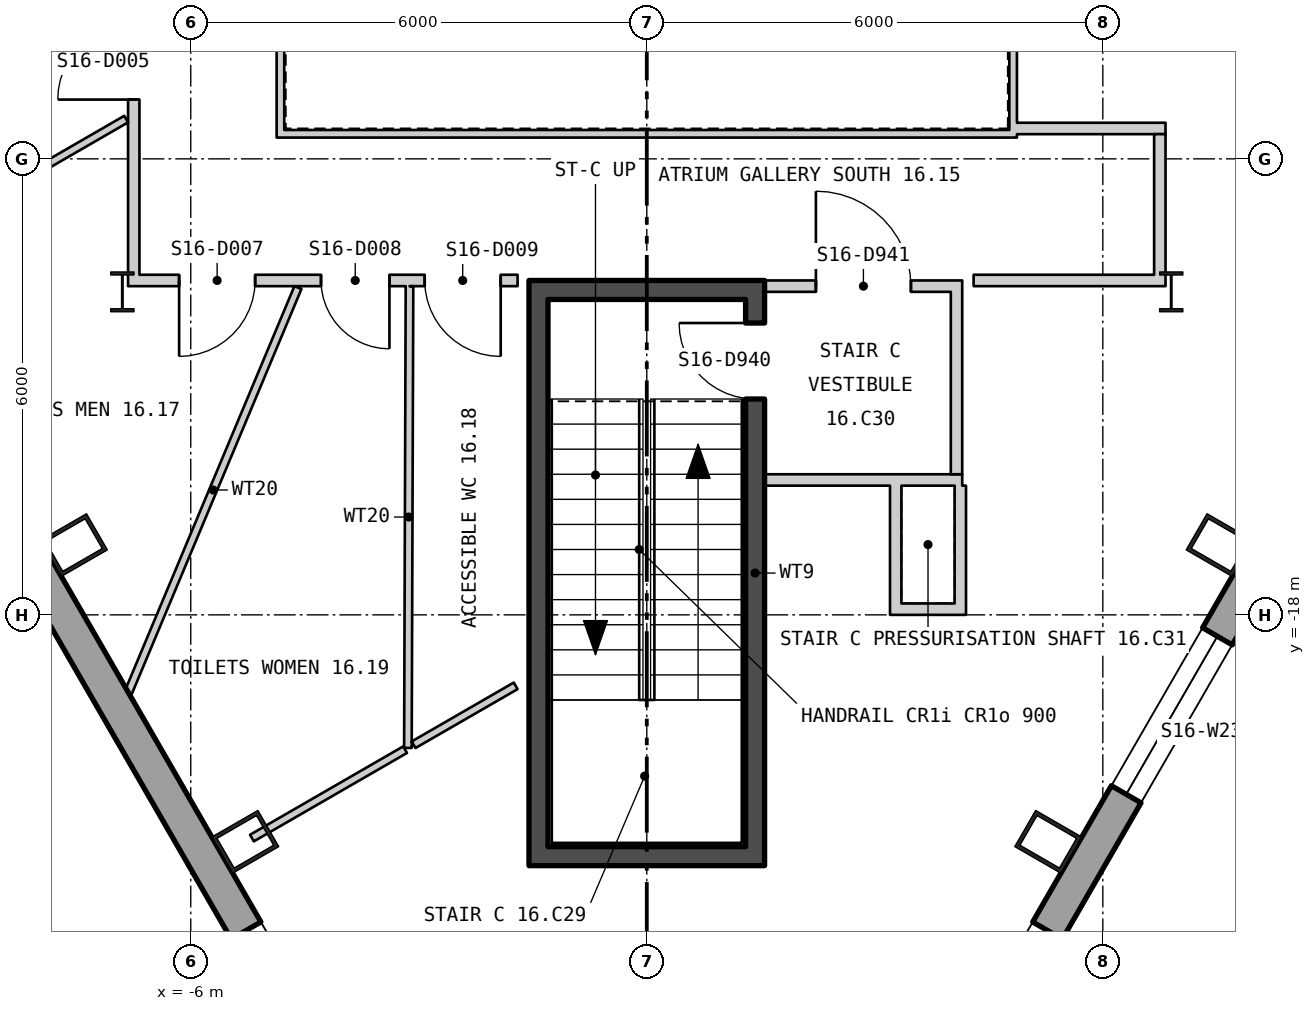
"""IFC4 building model, lengths in metres.
Left out: names, types, materials, properties, quantities, classifications, styles, units other than length and angle.
Written with IfcOpenShell. Run it as: python <this file> out.ifc"""

import sys

from ifc_helpers import new_model, si_unit, direction, frame, frame_2d, origin, origin_2d, place, context, subcontext, project, spatial, polyline, rectangle, hollow_rectangle, i_section, outline, extrude, element, fill, save


model = new_model("IFC4")
c1 = context("Model", 3, precision=1e-05, world=origin(), true_north=direction((0.0, 1.0)))
c2 = subcontext(c1, "Body", "Model", "MODEL_VIEW")
j1 = project(units=[si_unit("LENGTHUNIT", "METRE"), si_unit("PLANEANGLEUNIT", "RADIAN")], contexts=[c1])
p1 = place(None, origin())
s1 = spatial("IfcSite", under=j1, at=p1, CompositionType="ELEMENT")
p2 = place(p1, origin())
s2 = spatial("IfcBuilding", under=s1, at=p2, CompositionType="ELEMENT")
p3 = place(p2, frame((0.0, 0.0, 216.0)))
s3 = spatial("IfcBuildingStorey", under=s2, at=p3, CompositionType="ELEMENT", Elevation=216.0)
for number, where, z_axis, x_axis in (
    (1, (-7.537, -17.082, 0.0), (0.0, 0.0, 1.0), (0.5, -0.866, 0.0)),
    (2, (-5.282, -20.986, 0.0), (0.0, 0.0, 1.0), (0.5, -0.866, 0.0)),
    (3, (5.282, -20.986, 0.0), (0.0, 0.0, 1.0), (0.5, 0.866, 0.0)),
    (4, (7.537, -17.082, 0.0), (0.0, 0.0, 1.0), (0.5, 0.866, 0.0)),
):
    element("IfcColumn", number, at=place(p3, frame(where, z_axis=z_axis, x_axis=x_axis)), inside=s3, PredefinedType="COLUMN", context=c2, shape_type="SweptSolid", body=[
        extrude(hollow_rectangle(XDim=0.55, YDim=0.7, WallThickness=0.05, at=origin_2d()), origin(), (0.0, 0.0, 1.0), 3.9),
    ])
for number, where, z_axis, x_axis in (
    (5, (6.9, -13.75, 0.0), (0.0, 0.0, 1.0), (1.0, 0.0, 0.0)),
    (6, (-6.9, -13.75, 0.0), (0.0, 0.0, 1.0), (1.0, 0.0, 0.0)),
):
    element("IfcColumn", number, at=place(p3, frame(where, z_axis=z_axis, x_axis=x_axis)), inside=s3, PredefinedType="COLUMN", context=c2, shape_type="SweptSolid", body=[
        extrude(i_section(OverallWidth=0.306, OverallDepth=0.524, WebThickness=0.021, FlangeThickness=0.04, at=origin_2d()), origin(), (0.0, 0.0, 1.0), 3.9),
    ])
p4 = place(p3, frame((-26.235, 14.155, -0.18), z_axis=(0.0, 0.0, 1.0), x_axis=(0.500000335318, -0.866025210188, 0.0)))
e7 = element("IfcWall", 7, at=p4, inside=s3, PredefinedType="SOLIDWALL", context=c2, shape_type="SweptSolid", body=[
    extrude(outline(polyline([(-0.13, -0.225), (45.88, -0.225), (45.62, 0.225), (0.13, 0.225), (-0.13, -0.225)])), origin(), (0.0, 0.0, 1.0), 3.68),
])
p5 = place(p4, frame((1.425, 0.0, 1.08)))
e8 = element("IfcOpeningElement", 8, at=p5, cuts=e7, PredefinedType="OPENING", context=c2, shape_type="SweptSolid", body=[
    extrude(rectangle(XDim=2.4, YDim=2.0, at=frame_2d((1.2, 1.0))), frame((0.0, 0.235, 0.0), z_axis=(0.0, -1.0, 0.0), x_axis=(1.0, 0.0, 0.0)), (0.0, 0.0, 1.0), 0.47),
])
p6 = place(p4, frame((5.895, 0.0, 1.08)))
e9 = element("IfcOpeningElement", 9, at=p6, cuts=e7, PredefinedType="OPENING", context=c2, shape_type="SweptSolid", body=[
    extrude(rectangle(XDim=2.4, YDim=2.0, at=frame_2d((1.2, 1.0))), frame((0.0, 0.235, 0.0), z_axis=(0.0, -1.0, 0.0), x_axis=(1.0, 0.0, 0.0)), (0.0, 0.0, 1.0), 0.47),
])
p7 = place(p4, frame((10.403, 0.0, 1.08)))
e10 = element("IfcOpeningElement", 10, at=p7, cuts=e7, PredefinedType="OPENING", context=c2, shape_type="SweptSolid", body=[
    extrude(rectangle(XDim=2.4, YDim=2.0, at=frame_2d((1.2, 1.0))), frame((0.0, 0.235, 0.0), z_axis=(0.0, -1.0, 0.0), x_axis=(1.0, 0.0, 0.0)), (0.0, 0.0, 1.0), 0.47),
])
p8 = place(p4, frame((19.421, 0.0, 1.08)))
e11 = element("IfcOpeningElement", 11, at=p8, cuts=e7, PredefinedType="OPENING", context=c2, shape_type="SweptSolid", body=[
    extrude(rectangle(XDim=2.4, YDim=2.0, at=frame_2d((1.2, 1.0))), frame((0.0, 0.235, 0.0), z_axis=(0.0, -1.0, 0.0), x_axis=(1.0, 0.0, 0.0)), (0.0, 0.0, 1.0), 0.47),
])
p9 = place(p4, frame((23.929, 0.0, 1.08)))
e12 = element("IfcOpeningElement", 12, at=p9, cuts=e7, PredefinedType="OPENING", context=c2, shape_type="SweptSolid", body=[
    extrude(rectangle(XDim=2.4, YDim=2.0, at=frame_2d((1.2, 1.0))), frame((0.0, 0.235, 0.0), z_axis=(0.0, -1.0, 0.0), x_axis=(1.0, 0.0, 0.0)), (0.0, 0.0, 1.0), 0.47),
])
p10 = place(p4, frame((28.438, 0.0, 1.08)))
e13 = element("IfcOpeningElement", 13, at=p10, cuts=e7, PredefinedType="OPENING", context=c2, shape_type="SweptSolid", body=[
    extrude(rectangle(XDim=2.4, YDim=2.0, at=frame_2d((1.2, 1.0))), frame((0.0, 0.235, 0.0), z_axis=(0.0, -1.0, 0.0), x_axis=(1.0, 0.0, 0.0)), (0.0, 0.0, 1.0), 0.47),
])
p11 = place(p4, frame((32.947, 0.0, 1.08)))
e14 = element("IfcOpeningElement", 14, at=p11, cuts=e7, PredefinedType="OPENING", context=c2, shape_type="SweptSolid", body=[
    extrude(rectangle(XDim=2.4, YDim=2.0, at=frame_2d((1.2, 1.0))), frame((0.0, 0.235, 0.0), z_axis=(0.0, -1.0, 0.0), x_axis=(1.0, 0.0, 0.0)), (0.0, 0.0, 1.0), 0.47),
])
p12 = place(p4, frame((41.925, 0.0, 1.08)))
e15 = element("IfcOpeningElement", 15, at=p12, cuts=e7, PredefinedType="OPENING", context=c2, shape_type="SweptSolid", body=[
    extrude(rectangle(XDim=2.4, YDim=2.0, at=frame_2d((1.2, 1.0))), frame((0.0, 0.235, 0.0), z_axis=(0.0, -1.0, 0.0), x_axis=(1.0, 0.0, 0.0)), (0.0, 0.0, 1.0), 0.47),
])
p13 = place(p3, frame((3.36, -25.466, -0.18), z_axis=(0.0, 0.0, 1.0), x_axis=(0.500000335318, 0.866025210188, 0.0)))
e16 = element("IfcWall", 16, at=p13, inside=s3, PredefinedType="SOLIDWALL", context=c2, shape_type="SweptSolid", body=[
    extrude(outline(polyline([(-0.13, -0.225), (45.88, -0.225), (45.62, 0.225), (0.13, 0.225), (-0.13, -0.225)])), origin(), (0.0, 0.0, 1.0), 3.68),
])
p14 = place(p13, frame((1.425, 0.0, 1.08)))
e17 = element("IfcOpeningElement", 17, at=p14, cuts=e16, PredefinedType="OPENING", context=c2, shape_type="SweptSolid", body=[
    extrude(rectangle(XDim=2.4, YDim=2.0, at=frame_2d((1.2, 1.0))), frame((0.0, 0.235, 0.0), z_axis=(0.0, -1.0, 0.0), x_axis=(1.0, 0.0, 0.0)), (0.0, 0.0, 1.0), 0.47),
])
p15 = place(p13, frame((5.895, 0.0, 1.08)))
e18 = element("IfcOpeningElement", 18, at=p15, cuts=e16, PredefinedType="OPENING", context=c2, shape_type="SweptSolid", body=[
    extrude(rectangle(XDim=2.4, YDim=2.0, at=frame_2d((1.2, 1.0))), frame((0.0, 0.235, 0.0), z_axis=(0.0, -1.0, 0.0), x_axis=(1.0, 0.0, 0.0)), (0.0, 0.0, 1.0), 0.47),
])
p16 = place(p13, frame((10.403, 0.0, 1.08)))
e19 = element("IfcOpeningElement", 19, at=p16, cuts=e16, PredefinedType="OPENING", context=c2, shape_type="SweptSolid", body=[
    extrude(rectangle(XDim=2.4, YDim=2.0, at=frame_2d((1.2, 1.0))), frame((0.0, 0.235, 0.0), z_axis=(0.0, -1.0, 0.0), x_axis=(1.0, 0.0, 0.0)), (0.0, 0.0, 1.0), 0.47),
])
p17 = place(p13, frame((14.912, 0.0, 1.08)))
e20 = element("IfcOpeningElement", 20, at=p17, cuts=e16, PredefinedType="OPENING", context=c2, shape_type="SweptSolid", body=[
    extrude(rectangle(XDim=2.4, YDim=2.0, at=frame_2d((1.2, 1.0))), frame((0.0, 0.235, 0.0), z_axis=(0.0, -1.0, 0.0), x_axis=(1.0, 0.0, 0.0)), (0.0, 0.0, 1.0), 0.47),
])
p18 = place(p13, frame((19.421, 0.0, 1.08)))
e21 = element("IfcOpeningElement", 21, at=p18, cuts=e16, PredefinedType="OPENING", context=c2, shape_type="SweptSolid", body=[
    extrude(rectangle(XDim=2.4, YDim=2.0, at=frame_2d((1.2, 1.0))), frame((0.0, 0.235, 0.0), z_axis=(0.0, -1.0, 0.0), x_axis=(1.0, 0.0, 0.0)), (0.0, 0.0, 1.0), 0.47),
])
p19 = place(p13, frame((23.929, 0.0, 1.08)))
e22 = element("IfcOpeningElement", 22, at=p19, cuts=e16, PredefinedType="OPENING", context=c2, shape_type="SweptSolid", body=[
    extrude(rectangle(XDim=2.4, YDim=2.0, at=frame_2d((1.2, 1.0))), frame((0.0, 0.235, 0.0), z_axis=(0.0, -1.0, 0.0), x_axis=(1.0, 0.0, 0.0)), (0.0, 0.0, 1.0), 0.47),
])
p20 = place(p13, frame((32.947, 0.0, 1.08)))
e23 = element("IfcOpeningElement", 23, at=p20, cuts=e16, PredefinedType="OPENING", context=c2, shape_type="SweptSolid", body=[
    extrude(rectangle(XDim=2.4, YDim=2.0, at=frame_2d((1.2, 1.0))), frame((0.0, 0.235, 0.0), z_axis=(0.0, -1.0, 0.0), x_axis=(1.0, 0.0, 0.0)), (0.0, 0.0, 1.0), 0.47),
])
p21 = place(p13, frame((37.455, 0.0, 1.08)))
e24 = element("IfcOpeningElement", 24, at=p21, cuts=e16, PredefinedType="OPENING", context=c2, shape_type="SweptSolid", body=[
    extrude(rectangle(XDim=2.4, YDim=2.0, at=frame_2d((1.2, 1.0))), frame((0.0, 0.235, 0.0), z_axis=(0.0, -1.0, 0.0), x_axis=(1.0, 0.0, 0.0)), (0.0, 0.0, 1.0), 0.47),
])
p22 = place(p13, frame((41.925, 0.0, 1.08)))
e25 = element("IfcOpeningElement", 25, at=p22, cuts=e16, PredefinedType="OPENING", context=c2, shape_type="SweptSolid", body=[
    extrude(rectangle(XDim=2.4, YDim=2.0, at=frame_2d((1.2, 1.0))), frame((0.0, 0.235, 0.0), z_axis=(0.0, -1.0, 0.0), x_axis=(1.0, 0.0, 0.0)), (0.0, 0.0, 1.0), 0.47),
])
p23 = place(p3, frame((-4.87, -11.67, 0.0), z_axis=(0.0, 0.0, 1.0), x_axis=(1.0, 0.0, 0.0)))
e26 = element("IfcWall", 26, at=p23, inside=s3, PredefinedType="PARTITIONING", context=c2, shape_type="SweptSolid", body=[
    extrude(rectangle(XDim=9.74, YDim=0.1, at=frame_2d((4.87, 0.0))), origin(), (0.0, 0.0, 1.0), 3.7),
])
for number, where, z_axis, x_axis in (
    (27, (4.82, -11.62, 0.0), (0.0, 0.0, 1.0), (0.0, 1.0, 0.0)),
    (28, (-4.82, -3.58, 0.0), (0.0, 0.0, 1.0), (0.0, -1.0, 0.0)),
):
    element("IfcWall", number, at=place(p3, frame(where, z_axis=z_axis, x_axis=x_axis)), inside=s3, PredefinedType="PARTITIONING", context=c2, shape_type="SweptSolid", body=[
        extrude(rectangle(XDim=8.04, YDim=0.1, at=frame_2d((4.02, 0.0))), origin(), (0.0, 0.0, 1.0), 3.7),
    ])
p24 = place(p3, frame((-1.425, -21.05, 0.0), z_axis=(0.0, 0.0, 1.0), x_axis=(0.0, 1.0, 0.0)))
e29 = element("IfcWall", 29, at=p24, inside=s3, PredefinedType="SHEAR", context=c2, shape_type="SweptSolid", body=[
    extrude(rectangle(XDim=7.2, YDim=0.25, at=frame_2d((3.6, 0.0))), origin(), (0.0, 0.0, 1.0), 3.7),
])
p25 = place(p3, frame((1.425, -21.05, 0.0), z_axis=(0.0, 0.0, 1.0), x_axis=(0.0, 1.0, 0.0)))
e30 = element("IfcWall", 30, at=p25, inside=s3, PredefinedType="SHEAR", context=c2, shape_type="SweptSolid", body=[
    extrude(rectangle(XDim=7.2, YDim=0.25, at=frame_2d((3.6, 0.0))), origin(), (0.0, 0.0, 1.0), 3.7),
])
p26 = place(p25, frame((5.89, 0.0, 0.0)))
e31 = element("IfcOpeningElement", 31, at=p26, cuts=e30, PredefinedType="OPENING", context=c2, shape_type="SweptSolid", body=[
    extrude(rectangle(XDim=1.0, YDim=2.1, at=frame_2d((0.5, 1.05))), frame((0.0, 0.135, 0.0), z_axis=(0.0, -1.0, 0.0), x_axis=(1.0, 0.0, 0.0)), (0.0, 0.0, 1.0), 0.27),
])
for number, where, z_axis, x_axis in (
    (32, (-1.55, -21.175, 0.0), (0.0, 0.0, 1.0), (1.0, 0.0, 0.0)),
    (33, (-1.55, -13.725, 0.0), (0.0, 0.0, 1.0), (1.0, 0.0, 0.0)),
):
    element("IfcWall", number, at=place(p3, frame(where, z_axis=z_axis, x_axis=x_axis)), inside=s3, PredefinedType="SHEAR", context=c2, shape_type="SweptSolid", body=[
        extrude(rectangle(XDim=3.1, YDim=0.25, at=frame_2d((1.55, 0.0))), origin(), (0.0, 0.0, 1.0), 3.7),
    ])
p27 = place(p3, frame((1.55, -16.225, 0.0), z_axis=(0.0, 0.0, 1.0), x_axis=(1.0, 0.0, 0.0)))
e34 = element("IfcWall", 34, at=p27, inside=s3, PredefinedType="PARTITIONING", context=c2, shape_type="SweptSolid", body=[
    extrude(rectangle(XDim=2.6, YDim=0.15, at=frame_2d((1.3, 0.0))), origin(), (0.0, 0.0, 1.0), 3.7),
])
p28 = place(p3, frame((4.075, -16.15, 0.0), z_axis=(0.0, 0.0, 1.0), x_axis=(0.0, 1.0, 0.0)))
e35 = element("IfcWall", 35, at=p28, inside=s3, PredefinedType="PARTITIONING", context=c2, shape_type="SweptSolid", body=[
    extrude(rectangle(XDim=2.4, YDim=0.15, at=frame_2d((1.2, 0.0))), origin(), (0.0, 0.0, 1.0), 3.7),
])
p29 = place(p3, frame((1.55, -13.675, 0.0), z_axis=(0.0, 0.0, 1.0), x_axis=(1.0, 0.0, 0.0)))
e36 = element("IfcWall", 36, at=p29, inside=s3, PredefinedType="PARTITIONING", context=c2, shape_type="SweptSolid", body=[
    extrude(rectangle(XDim=2.6, YDim=0.15, at=frame_2d((1.3, 0.0))), origin(), (0.0, 0.0, 1.0), 2.91),
])
p30 = place(p29, frame((0.675, 0.0, 0.0)))
e37 = element("IfcOpeningElement", 37, at=p30, cuts=e36, PredefinedType="OPENING", context=c2, shape_type="SweptSolid", body=[
    extrude(rectangle(XDim=1.25, YDim=2.1, at=frame_2d((0.625, 1.05))), frame((0.0, 0.085, 0.0), z_axis=(0.0, -1.0, 0.0), x_axis=(1.0, 0.0, 0.0)), (0.0, 0.0, 1.0), 0.17),
])
p31 = place(p3, frame((3.275, -18.0, 0.0), z_axis=(0.0, 0.0, 1.0), x_axis=(0.0, 1.0, 0.0)))
e38 = element("IfcWall", 38, at=p31, inside=s3, PredefinedType="PARTITIONING", context=c2, shape_type="SweptSolid", body=[
    extrude(rectangle(XDim=1.7, YDim=0.15, at=frame_2d((0.85, 0.0))), origin(), (0.0, 0.0, 1.0), 3.01),
])
p32 = place(p3, frame((3.35, -17.925, 0.0), z_axis=(0.0, 0.0, 1.0), x_axis=(1.0, 0.0, 0.0)))
e39 = element("IfcWall", 39, at=p32, inside=s3, PredefinedType="PARTITIONING", context=c2, shape_type="SweptSolid", body=[
    extrude(rectangle(XDim=0.7, YDim=0.15, at=frame_2d((0.35, 0.0))), origin(), (0.0, 0.0, 1.0), 3.7),
])
p33 = place(p3, frame((4.125, -18.0, 0.0), z_axis=(0.0, 0.0, 1.0), x_axis=(0.0, 1.0, 0.0)))
e40 = element("IfcWall", 40, at=p33, inside=s3, PredefinedType="PARTITIONING", context=c2, shape_type="SweptSolid", body=[
    extrude(rectangle(XDim=1.7, YDim=0.15, at=frame_2d((0.85, 0.0))), origin(), (0.0, 0.0, 1.0), 3.7),
])
p34 = place(p3, frame((-9.705, -13.126, 0.0), z_axis=(0.0, 0.0, 1.0), x_axis=(0.865938055058, 0.500151261923, 0.0)))
e41 = element("IfcWall", 41, at=p34, inside=s3, PredefinedType="PARTITIONING", context=c2, shape_type="SweptSolid", body=[
    extrude(rectangle(XDim=3.297, YDim=0.1, at=frame_2d((1.649, 0.0))), origin(), (0.0, 0.0, 1.0), 3.7),
])
p35 = place(p3, frame((-6.821, -19.02, 0.0), z_axis=(0.0, 0.0, 1.0), x_axis=(0.386360825785, 0.922347717674, 0.0)))
e42 = element("IfcWall", 42, at=p35, inside=s3, PredefinedType="PARTITIONING", context=c2, shape_type="SweptSolid", body=[
    extrude(rectangle(XDim=5.774, YDim=0.1, at=frame_2d((2.887, 0.0))), origin(), (0.0, 0.0, 1.0), 3.7),
])
p36 = place(p3, frame((-6.75, -13.675, 0.0), z_axis=(0.0, 0.0, 1.0), x_axis=(0.0, 1.0, 0.0)))
e43 = element("IfcWall", 43, at=p36, inside=s3, PredefinedType="PARTITIONING", context=c2, shape_type="SweptSolid", body=[
    extrude(rectangle(XDim=10.263, YDim=0.15, at=frame_2d((5.131, 0.0))), origin(), (0.0, 0.0, 1.0), 3.11),
])
p37 = place(p36, frame((2.455, 0.0, 0.0)))
e44 = element("IfcOpeningElement", 44, at=p37, cuts=e43, PredefinedType="OPENING", context=c2, shape_type="SweptSolid", body=[
    extrude(rectangle(XDim=1.0, YDim=2.1, at=frame_2d((0.5, 1.05))), frame((0.0, 0.085, 0.0), z_axis=(0.0, -1.0, 0.0), x_axis=(1.0, 0.0, 0.0)), (0.0, 0.0, 1.0), 0.17),
])
p38 = place(p3, frame((-6.675, -13.6, 0.0), z_axis=(0.0, 0.0, 1.0), x_axis=(1.0, 0.0, 0.0)))
e45 = element("IfcWall", 45, at=p38, inside=s3, PredefinedType="PARTITIONING", context=c2, shape_type="SweptSolid", body=[
    extrude(rectangle(XDim=4.975, YDim=0.15, at=frame_2d((2.487, 0.0))), origin(), (0.0, 0.0, 1.0), 2.91),
])
p39 = place(p38, frame((0.522, 0.0, 0.0)))
e46 = element("IfcOpeningElement", 46, at=p39, cuts=e45, PredefinedType="OPENING", context=c2, shape_type="SweptSolid", body=[
    extrude(rectangle(XDim=1.0, YDim=2.1, at=frame_2d((0.5, 1.05))), frame((0.0, 0.085, 0.0), z_axis=(0.0, -1.0, 0.0), x_axis=(1.0, 0.0, 0.0)), (0.0, 0.0, 1.0), 0.17),
])
p40 = place(p38, frame((2.389, 0.0, 0.0)))
e47 = element("IfcOpeningElement", 47, at=p40, cuts=e45, PredefinedType="OPENING", context=c2, shape_type="SweptSolid", body=[
    extrude(rectangle(XDim=0.9, YDim=2.1, at=frame_2d((0.45, 1.05))), frame((0.0, 0.085, 0.0), z_axis=(0.0, -1.0, 0.0), x_axis=(1.0, 0.0, 0.0)), (0.0, 0.0, 1.0), 0.17),
])
p41 = place(p38, frame((3.753, 0.0, 0.0)))
e48 = element("IfcOpeningElement", 48, at=p41, cuts=e45, PredefinedType="OPENING", context=c2, shape_type="SweptSolid", body=[
    extrude(rectangle(XDim=1.0, YDim=2.1, at=frame_2d((0.5, 1.05))), frame((0.0, 0.085, 0.0), z_axis=(0.0, -1.0, 0.0), x_axis=(1.0, 0.0, 0.0)), (0.0, 0.0, 1.0), 0.17),
])
p42 = place(p3, frame((-5.195, -20.937, 0.0), z_axis=(0.0, 0.0, 1.0), x_axis=(0.866092546171, 0.499883687939, 0.0)))
e49 = element("IfcWall", 49, at=p42, inside=s3, PredefinedType="PARTITIONING", context=c2, shape_type="SweptSolid", body=[
    extrude(rectangle(XDim=2.326, YDim=0.1, at=frame_2d((1.163, 0.0))), origin(), (0.0, 0.0, 1.0), 3.7),
])
p43 = place(p3, frame((-3.143, -19.751, 0.0), z_axis=(0.0, 0.0, 1.0), x_axis=(0.003456200555, 0.999994027321, 0.0)))
e50 = element("IfcWall", 50, at=p43, inside=s3, PredefinedType="PARTITIONING", context=c2, shape_type="SweptSolid", body=[
    extrude(rectangle(XDim=6.076, YDim=0.1, at=frame_2d((3.038, 0.0))), origin(), (0.0, 0.0, 1.0), 3.01),
])
p44 = place(p3, frame((-3.068, -19.709, 0.0), z_axis=(0.0, 0.0, 1.0), x_axis=(0.866131897097, 0.499815502792, 0.0)))
e51 = element("IfcWall", 51, at=p44, inside=s3, PredefinedType="PARTITIONING", context=c2, shape_type="SweptSolid", body=[
    extrude(rectangle(XDim=1.551, YDim=0.1, at=frame_2d((0.775, 0.0))), origin(), (0.0, 0.0, 1.0), 3.7),
])
p45 = place(p3, frame((4.3, -13.6, 0.0), z_axis=(0.0, 0.0, 1.0), x_axis=(1.0, 0.0, 0.0)))
e52 = element("IfcWall", 52, at=p45, inside=s3, PredefinedType="PARTITIONING", context=c2, shape_type="SweptSolid", body=[
    extrude(rectangle(XDim=2.525, YDim=0.15, at=frame_2d((1.262, 0.0))), origin(), (0.0, 0.0, 1.0), 2.91),
])
p46 = place(p3, frame((4.87, -11.6, 0.0), z_axis=(0.0, 0.0, 1.0), x_axis=(1.0, 0.0, 0.0)))
e53 = element("IfcWall", 53, at=p46, inside=s3, PredefinedType="PARTITIONING", context=c2, shape_type="SweptSolid", body=[
    extrude(rectangle(XDim=1.955, YDim=0.15, at=frame_2d((0.978, 0.0))), origin(), (0.0, 0.0, 1.0), 3.7),
])
p47 = place(p3, frame((6.75, -13.525, 0.0), z_axis=(0.0, 0.0, 1.0), x_axis=(0.0, 1.0, 0.0)))
e54 = element("IfcWall", 54, at=p47, inside=s3, PredefinedType="PARTITIONING", context=c2, shape_type="SweptSolid", body=[
    extrude(rectangle(XDim=1.85, YDim=0.15, at=frame_2d((0.925, 0.0))), origin(), (0.0, 0.0, 1.0), 3.11),
])
p48 = place(p12, origin())
e55 = element("IfcWindow", 55, at=p48, inside=s3, PartitioningType="SINGLE_PANEL", PredefinedType="WINDOW", context=c2, shape_type="SweptSolid", body=[
    extrude(rectangle(XDim=2.4, YDim=2.0, at=frame_2d((1.2, 1.0))), frame((0.0, 0.105, 0.0), z_axis=(0.0, -1.0, 0.0), x_axis=(1.0, 0.0, 0.0)), (0.0, 0.0, 1.0), 0.06),
])
fill(e15, e55)
p49 = place(p14, origin())
e56 = element("IfcWindow", 56, at=p49, inside=s3, PartitioningType="SINGLE_PANEL", PredefinedType="WINDOW", context=c2, shape_type="SweptSolid", body=[
    extrude(rectangle(XDim=2.4, YDim=2.0, at=frame_2d((1.2, 1.0))), frame((0.0, 0.105, 0.0), z_axis=(0.0, -1.0, 0.0), x_axis=(1.0, 0.0, 0.0)), (0.0, 0.0, 1.0), 0.06),
])
fill(e17, e56)
p50 = place(p15, origin())
e57 = element("IfcWindow", 57, at=p50, inside=s3, PartitioningType="SINGLE_PANEL", PredefinedType="WINDOW", context=c2, shape_type="SweptSolid", body=[
    extrude(rectangle(XDim=2.4, YDim=2.0, at=frame_2d((1.2, 1.0))), frame((0.0, 0.105, 0.0), z_axis=(0.0, -1.0, 0.0), x_axis=(1.0, 0.0, 0.0)), (0.0, 0.0, 1.0), 0.06),
])
fill(e18, e57)
p51 = place(p26, origin())
e58 = element("IfcDoor", 58, at=p51, inside=s3, OperationType="SINGLE_SWING_LEFT", PredefinedType="DOOR", context=c2, shape_type="SweptSolid", body=[
    extrude(rectangle(XDim=1.0, YDim=2.1, at=frame_2d((0.5, 1.05))), frame((0.0, 0.025, 0.0), z_axis=(0.0, -1.0, 0.0), x_axis=(1.0, 0.0, 0.0)), (0.0, 0.0, 1.0), 0.05),
])
fill(e31, e58)
p52 = place(p30, origin())
e59 = element("IfcDoor", 59, at=p52, inside=s3, OperationType="SINGLE_SWING_RIGHT", PredefinedType="DOOR", context=c2, shape_type="SweptSolid", body=[
    extrude(rectangle(XDim=1.25, YDim=2.1, at=frame_2d((0.625, 1.05))), frame((0.0, 0.025, 0.0), z_axis=(0.0, -1.0, 0.0), x_axis=(1.0, 0.0, 0.0)), (0.0, 0.0, 1.0), 0.05),
])
fill(e37, e59)
p53 = place(p37, origin())
e60 = element("IfcDoor", 60, at=p53, inside=s3, OperationType="SINGLE_SWING_RIGHT", PredefinedType="DOOR", context=c2, shape_type="SweptSolid", body=[
    extrude(rectangle(XDim=1.0, YDim=2.1, at=frame_2d((0.5, 1.05))), frame((0.0, 0.025, 0.0), z_axis=(0.0, -1.0, 0.0), x_axis=(1.0, 0.0, 0.0)), (0.0, 0.0, 1.0), 0.05),
])
fill(e44, e60)
p54 = place(p39, origin())
e61 = element("IfcDoor", 61, at=p54, inside=s3, OperationType="SINGLE_SWING_LEFT", PredefinedType="DOOR", context=c2, shape_type="SweptSolid", body=[
    extrude(rectangle(XDim=1.0, YDim=2.1, at=frame_2d((0.5, 1.05))), frame((0.0, 0.025, 0.0), z_axis=(0.0, -1.0, 0.0), x_axis=(1.0, 0.0, 0.0)), (0.0, 0.0, 1.0), 0.05),
])
fill(e46, e61)
p55 = place(p40, origin())
e62 = element("IfcDoor", 62, at=p55, inside=s3, OperationType="SINGLE_SWING_RIGHT", PredefinedType="DOOR", context=c2, shape_type="SweptSolid", body=[
    extrude(rectangle(XDim=0.9, YDim=2.1, at=frame_2d((0.45, 1.05))), frame((0.0, 0.025, 0.0), z_axis=(0.0, -1.0, 0.0), x_axis=(1.0, 0.0, 0.0)), (0.0, 0.0, 1.0), 0.05),
])
fill(e47, e62)
p56 = place(p41, origin())
e63 = element("IfcDoor", 63, at=p56, inside=s3, OperationType="SINGLE_SWING_RIGHT", PredefinedType="DOOR", context=c2, shape_type="SweptSolid", body=[
    extrude(rectangle(XDim=1.0, YDim=2.1, at=frame_2d((0.5, 1.05))), frame((0.0, 0.025, 0.0), z_axis=(0.0, -1.0, 0.0), x_axis=(1.0, 0.0, 0.0)), (0.0, 0.0, 1.0), 0.05),
])
fill(e48, e63)
save(model, sys.argv[1])
